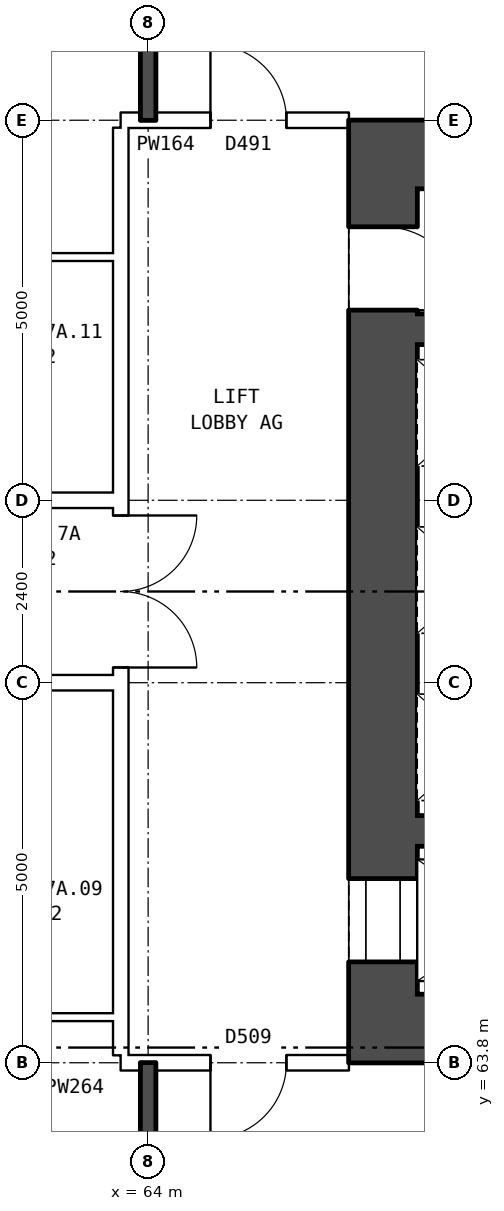
"""IFC4 building model, lengths in metres.
Left out: names, types, materials, properties, quantities, classifications, styles, units other than length and angle.
Written with IfcOpenShell. Run it as: python <this file> out.ifc"""

import sys

from ifc_helpers import new_model, si_unit, direction, frame, frame_2d, origin, place, context, subcontext, project, spatial, rectangle, extrude, element, fill, save


model = new_model("IFC4")
c1 = context("Model", 3, precision=1e-05, world=origin(), true_north=direction((0.0, 1.0)))
c2 = subcontext(c1, "Body", "Model", "MODEL_VIEW")
j1 = project(units=[si_unit("LENGTHUNIT", "METRE"), si_unit("PLANEANGLEUNIT", "RADIAN")], contexts=[c1])
p1 = place(None, origin())
s1 = spatial("IfcSite", under=j1, at=p1, CompositionType="ELEMENT")
p2 = place(p1, origin())
s2 = spatial("IfcBuilding", under=s1, at=p2, CompositionType="ELEMENT")
p3 = place(p2, frame((0.0, 0.0, 28.8)))
s3 = spatial("IfcBuildingStorey", under=s2, at=p3, CompositionType="ELEMENT", Elevation=28.8)
p4 = place(p3, frame((67.09, 64.7, 0.0), z_axis=(0.0, 0.0, 1.0), x_axis=(0.0, 1.0, 0.0)))
e1 = element("IfcWall", 1, at=p4, inside=s3, PredefinedType="SHEAR", context=c2, shape_type="SweptSolid", body=[
    extrude(rectangle(XDim=10.6, YDim=0.9, at=frame_2d((5.3, 0.0))), origin(), (0.0, 0.0, 1.0), 2.85),
])
p5 = place(p4, frame((0.425, 0.0, 0.0)))
e2 = element("IfcOpeningElement", 2, at=p5, cuts=e1, PredefinedType="OPENING", context=c2, shape_type="SweptSolid", body=[
    extrude(rectangle(XDim=1.1, YDim=2.1, at=frame_2d((0.55, 1.05))), frame((0.0, 0.46, 0.0), z_axis=(0.0, -1.0, 0.0), x_axis=(1.0, 0.0, 0.0)), (0.0, 0.0, 1.0), 0.92),
])
p6 = place(p4, frame((9.0, 0.0, 0.0)))
e3 = element("IfcOpeningElement", 3, at=p6, cuts=e1, PredefinedType="OPENING", context=c2, shape_type="SweptSolid", body=[
    extrude(rectangle(XDim=1.1, YDim=2.1, at=frame_2d((0.55, 1.05))), frame((0.0, 0.46, 0.0), z_axis=(0.0, -1.0, 0.0), x_axis=(1.0, 0.0, 0.0)), (0.0, 0.0, 1.0), 0.92),
])
for number, where, z_axis, x_axis in (
    (4, (66.64, 64.25, 0.0), (0.0, 0.0, 1.0), (1.0, 0.0, 0.0)),
    (5, (66.64, 75.75, 0.0), (0.0, 0.0, 1.0), (1.0, 0.0, 0.0)),
):
    element("IfcWall", number, at=place(p3, frame(where, z_axis=z_axis, x_axis=x_axis)), inside=s3, PredefinedType="SHEAR", context=c2, shape_type="SweptSolid", body=[
        extrude(rectangle(XDim=9.0, YDim=0.9, at=frame_2d((4.5, 0.0))), origin(), (0.0, 0.0, 1.0), 2.85),
    ])
p7 = place(p3, frame((67.54, 66.85, 0.0), z_axis=(0.0, 0.0, 1.0), x_axis=(1.0, 0.0, 0.0)))
e6 = element("IfcWall", 6, at=p7, inside=s3, PredefinedType="SHEAR", context=c2, shape_type="SweptSolid", body=[
    extrude(rectangle(XDim=3.17, YDim=0.4, at=frame_2d((1.585, 0.0))), origin(), (0.0, 0.0, 1.0), 2.85),
])
p8 = place(p3, frame((67.54, 73.45, 0.0), z_axis=(0.0, 0.0, 1.0), x_axis=(1.0, 0.0, 0.0)))
e7 = element("IfcWall", 7, at=p8, inside=s3, PredefinedType="SHEAR", context=c2, shape_type="SweptSolid", body=[
    extrude(rectangle(XDim=1.95, YDim=0.4, at=frame_2d((0.975, 0.0))), origin(), (0.0, 0.0, 1.0), 2.85),
])
p9 = place(p3, frame((63.64, 63.9, 0.0), z_axis=(0.0, 0.0, 1.0), x_axis=(0.0, 1.0, 0.0)))
e8 = element("IfcWall", 8, at=p9, inside=s3, PredefinedType="PARTITIONING", context=c2, shape_type="SweptSolid", body=[
    extrude(rectangle(XDim=12.2, YDim=0.2, at=frame_2d((6.1, 0.0))), origin(), (0.0, 0.0, 1.0), 2.85),
])
p10 = place(p9, frame((5.1, 0.0, 0.0)))
e9 = element("IfcOpeningElement", 9, at=p10, cuts=e8, PredefinedType="OPENING", context=c2, shape_type="SweptSolid", body=[
    extrude(rectangle(XDim=2.0, YDim=2.1, at=frame_2d((1.0, 1.05))), frame((0.0, 0.11, 0.0), z_axis=(0.0, -1.0, 0.0), x_axis=(1.0, 0.0, 0.0)), (0.0, 0.0, 1.0), 0.22),
])
p11 = place(p3, frame((63.64, 63.8, 0.0), z_axis=(0.0, 0.0, 1.0), x_axis=(1.0, 0.0, 0.0)))
e10 = element("IfcWall", 10, at=p11, inside=s3, PredefinedType="PARTITIONING", context=c2, shape_type="SweptSolid", body=[
    extrude(rectangle(XDim=3.0, YDim=0.2, at=frame_2d((1.5, 0.0))), origin(), (0.0, 0.0, 1.0), 2.85),
])
p12 = place(p11, frame((1.18, 0.0, 0.0)))
e11 = element("IfcOpeningElement", 11, at=p12, cuts=e10, PredefinedType="OPENING", context=c2, shape_type="SweptSolid", body=[
    extrude(rectangle(XDim=1.0, YDim=2.1, at=frame_2d((0.5, 1.05))), frame((0.0, 0.11, 0.0), z_axis=(0.0, -1.0, 0.0), x_axis=(1.0, 0.0, 0.0)), (0.0, 0.0, 1.0), 0.22),
])
p13 = place(p3, frame((61.0, 64.4, 0.0), z_axis=(0.0, 0.0, 1.0), x_axis=(1.0, 0.0, 0.0)))
e12 = element("IfcWall", 12, at=p13, inside=s3, PredefinedType="PARTITIONING", context=c2, shape_type="SweptSolid", body=[
    extrude(rectangle(XDim=2.64, YDim=0.1, at=frame_2d((1.32, 0.0))), origin(), (0.0, 0.0, 1.0), 2.85),
])
p14 = place(p3, frame((44.36, 68.8, 0.0), z_axis=(0.0, 0.0, 1.0), x_axis=(1.0, 0.0, 0.0)))
e13 = element("IfcWall", 13, at=p14, inside=s3, PredefinedType="PARTITIONING", context=c2, shape_type="SweptSolid", body=[
    extrude(rectangle(XDim=19.28, YDim=0.2, at=frame_2d((9.64, 0.0))), origin(), (0.0, 0.0, 1.0), 2.85),
])
p15 = place(p14, frame((14.64, 0.0, 0.0)))
e14 = element("IfcOpeningElement", 14, at=p15, cuts=e13, PredefinedType="OPENING", context=c2, shape_type="SweptSolid", body=[
    extrude(rectangle(XDim=1.0, YDim=2.1, at=frame_2d((0.5, 1.05))), frame((0.0, 0.11, 0.0), z_axis=(0.0, -1.0, 0.0), x_axis=(1.0, 0.0, 0.0)), (0.0, 0.0, 1.0), 0.22),
])
p16 = place(p14, frame((5.64, 0.0, 0.0)))
e15 = element("IfcOpeningElement", 15, at=p16, cuts=e13, PredefinedType="OPENING", context=c2, shape_type="SweptSolid", body=[
    extrude(rectangle(XDim=1.0, YDim=2.1, at=frame_2d((0.5, 1.05))), frame((0.0, 0.11, 0.0), z_axis=(0.0, -1.0, 0.0), x_axis=(1.0, 0.0, 0.0)), (0.0, 0.0, 1.0), 0.22),
])
p17 = place(p3, frame((44.36, 71.2, 0.0), z_axis=(0.0, 0.0, 1.0), x_axis=(1.0, 0.0, 0.0)))
e16 = element("IfcWall", 16, at=p17, inside=s3, PredefinedType="PARTITIONING", context=c2, shape_type="SweptSolid", body=[
    extrude(rectangle(XDim=19.28, YDim=0.2, at=frame_2d((9.64, 0.0))), origin(), (0.0, 0.0, 1.0), 2.85),
])
p18 = place(p17, frame((14.64, 0.0, 0.0)))
e17 = element("IfcOpeningElement", 17, at=p18, cuts=e16, PredefinedType="OPENING", context=c2, shape_type="SweptSolid", body=[
    extrude(rectangle(XDim=1.0, YDim=2.1, at=frame_2d((0.5, 1.05))), frame((0.0, 0.11, 0.0), z_axis=(0.0, -1.0, 0.0), x_axis=(1.0, 0.0, 0.0)), (0.0, 0.0, 1.0), 0.22),
])
p19 = place(p17, frame((5.64, 0.0, 0.0)))
e18 = element("IfcOpeningElement", 18, at=p19, cuts=e16, PredefinedType="OPENING", context=c2, shape_type="SweptSolid", body=[
    extrude(rectangle(XDim=1.0, YDim=2.1, at=frame_2d((0.5, 1.05))), frame((0.0, 0.11, 0.0), z_axis=(0.0, -1.0, 0.0), x_axis=(1.0, 0.0, 0.0)), (0.0, 0.0, 1.0), 0.22),
])
p20 = place(p3, frame((61.0, 74.4, 0.0), z_axis=(0.0, 0.0, 1.0), x_axis=(1.0, 0.0, 0.0)))
e19 = element("IfcWall", 19, at=p20, inside=s3, PredefinedType="PARTITIONING", context=c2, shape_type="SweptSolid", body=[
    extrude(rectangle(XDim=2.64, YDim=0.1, at=frame_2d((1.32, 0.0))), origin(), (0.0, 0.0, 1.0), 2.85),
])
p21 = place(p3, frame((63.64, 76.2, 0.0), z_axis=(0.0, 0.0, 1.0), x_axis=(1.0, 0.0, 0.0)))
e20 = element("IfcWall", 20, at=p21, inside=s3, PredefinedType="PARTITIONING", context=c2, shape_type="SweptSolid", body=[
    extrude(rectangle(XDim=3.0, YDim=0.2, at=frame_2d((1.5, 0.0))), origin(), (0.0, 0.0, 1.0), 2.85),
])
p22 = place(p21, frame((1.18, 0.0, 0.0)))
e21 = element("IfcOpeningElement", 21, at=p22, cuts=e20, PredefinedType="OPENING", context=c2, shape_type="SweptSolid", body=[
    extrude(rectangle(XDim=1.0, YDim=2.1, at=frame_2d((0.5, 1.05))), frame((0.0, 0.11, 0.0), z_axis=(0.0, -1.0, 0.0), x_axis=(1.0, 0.0, 0.0)), (0.0, 0.0, 1.0), 0.22),
])
for number, where, z_axis, x_axis in (
    (22, (64.0, 54.36, 0.0), (0.0, 0.0, 1.0), (0.0, 1.0, 0.0)),
    (23, (64.0, 76.2, 0.0), (0.0, 0.0, 1.0), (0.0, 1.0, 0.0)),
):
    element("IfcWall", number, at=place(p3, frame(where, z_axis=z_axis, x_axis=x_axis)), inside=s3, PredefinedType="SOLIDWALL", context=c2, shape_type="SweptSolid", body=[
        extrude(rectangle(XDim=9.44, YDim=0.2, at=frame_2d((4.72, 0.0))), origin(), (0.0, 0.0, 1.0), 2.85),
    ])
p23 = place(p5, origin())
e24 = element("IfcDoor", 24, at=p23, inside=s3, OperationType="DOUBLE_DOOR_SLIDING", PredefinedType="DOOR", context=c2, shape_type="SweptSolid", body=[
    extrude(rectangle(XDim=1.1, YDim=2.1, at=frame_2d((0.55, 1.05))), frame((0.0, -0.385, 0.0), z_axis=(0.0, -1.0, 0.0), x_axis=(1.0, 0.0, 0.0)), (0.0, 0.0, 1.0), 0.05),
])
fill(e2, e24)
p24 = place(p6, frame((1.1, 0.0, 0.0), z_axis=(0.0, 0.0, 1.0), x_axis=(-1.0, 0.0, 0.0)))
e25 = element("IfcDoor", 25, at=p24, inside=s3, OperationType="SINGLE_SWING_RIGHT", PredefinedType="DOOR", context=c2, shape_type="SweptSolid", body=[
    extrude(rectangle(XDim=1.1, YDim=2.1, at=frame_2d((0.55, 1.05))), frame((0.0, 0.435, 0.0), z_axis=(0.0, -1.0, 0.0), x_axis=(1.0, 0.0, 0.0)), (0.0, 0.0, 1.0), 0.05),
])
fill(e3, e25)
p25 = place(p10, frame((2.0, 0.0, 0.0), z_axis=(0.0, 0.0, 1.0), x_axis=(-1.0, 0.0, 0.0)))
e26 = element("IfcDoor", 26, at=p25, inside=s3, OperationType="DOUBLE_DOOR_SINGLE_SWING", PredefinedType="DOOR", context=c2, shape_type="SweptSolid", body=[
    extrude(rectangle(XDim=2.0, YDim=2.1, at=frame_2d((1.0, 1.05))), frame((0.0, 0.025, 0.0), z_axis=(0.0, -1.0, 0.0), x_axis=(1.0, 0.0, 0.0)), (0.0, 0.0, 1.0), 0.05),
])
fill(e9, e26)
p26 = place(p12, frame((1.0, 0.0, 0.0), z_axis=(0.0, 0.0, 1.0), x_axis=(-1.0, 0.0, 0.0)))
e27 = element("IfcDoor", 27, at=p26, inside=s3, OperationType="SINGLE_SWING_RIGHT", PredefinedType="DOOR", context=c2, shape_type="SweptSolid", body=[
    extrude(rectangle(XDim=1.0, YDim=2.1, at=frame_2d((0.5, 1.05))), frame((0.0, 0.025, 0.0), z_axis=(0.0, -1.0, 0.0), x_axis=(1.0, 0.0, 0.0)), (0.0, 0.0, 1.0), 0.05),
])
fill(e11, e27)
p27 = place(p22, origin())
e28 = element("IfcDoor", 28, at=p27, inside=s3, OperationType="SINGLE_SWING_LEFT", PredefinedType="DOOR", context=c2, shape_type="SweptSolid", body=[
    extrude(rectangle(XDim=1.0, YDim=2.1, at=frame_2d((0.5, 1.05))), frame((0.0, 0.025, 0.0), z_axis=(0.0, -1.0, 0.0), x_axis=(1.0, 0.0, 0.0)), (0.0, 0.0, 1.0), 0.05),
])
fill(e21, e28)
save(model, sys.argv[1])
